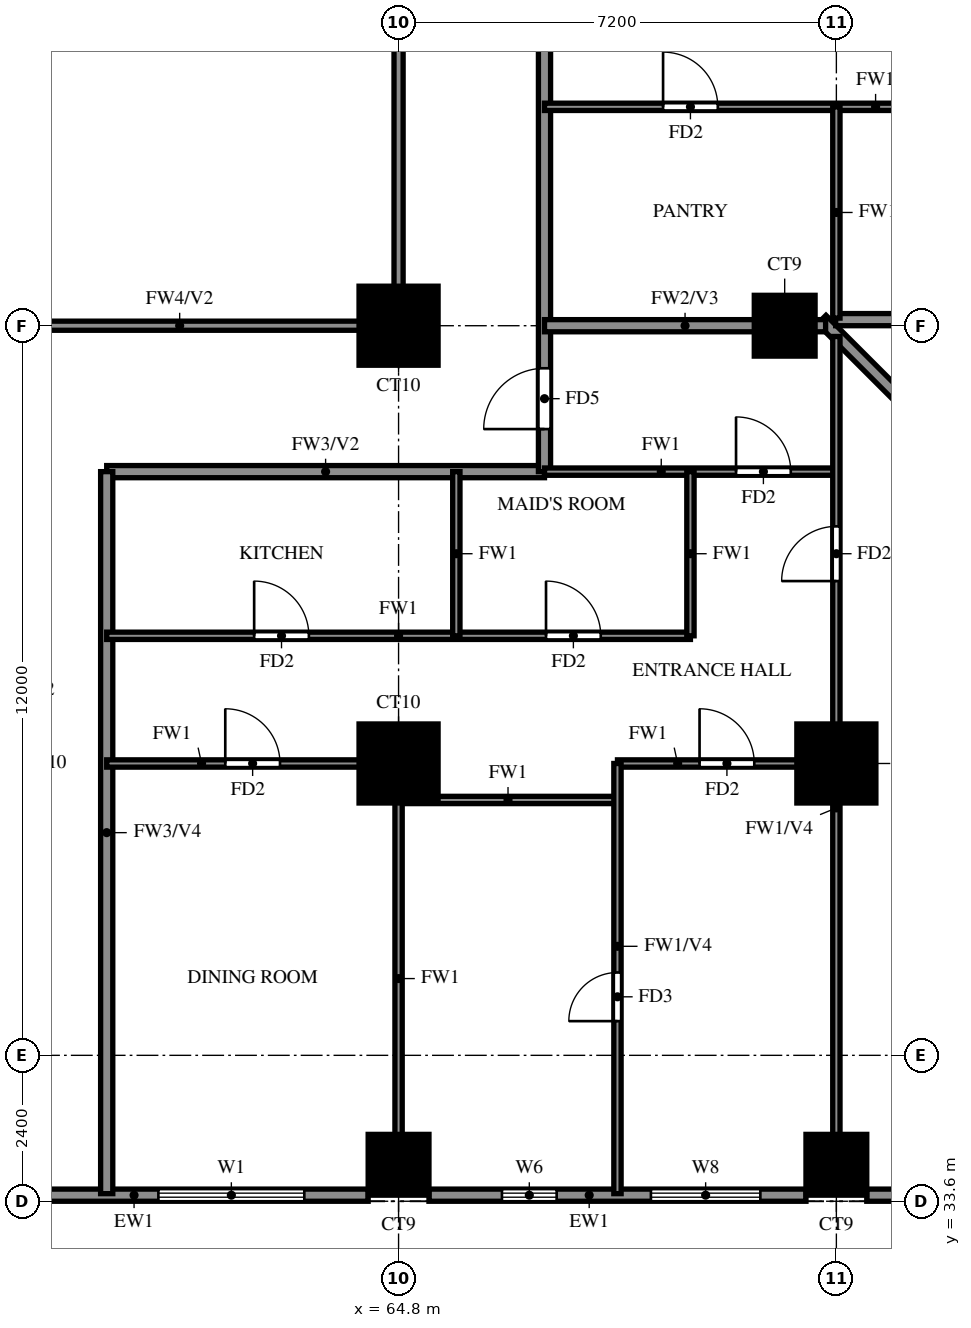
"""IFC4 building model, lengths in metres.
Left out: names, types, materials, properties, quantities, classifications, styles, units other than length and angle.
Written with IfcOpenShell. Run it as: python <this file> out.ifc"""

import sys

from ifc_helpers import new_model, si_unit, direction, frame, frame_2d, origin, origin_2d, place, context, subcontext, project, spatial, rectangle, extrude, source, transform, mapped, element, fill, save


model = new_model("IFC4")
c1 = context("Model", 3, precision=1e-05, world=origin(), true_north=direction((0.0, 1.0)))
c2 = subcontext(c1, "Body", "Model", "MODEL_VIEW")
j1 = project(units=[si_unit("LENGTHUNIT", "METRE"), si_unit("PLANEANGLEUNIT", "RADIAN")], contexts=[c1])
p1 = place(None, origin())
s1 = spatial("IfcSite", under=j1, at=p1, CompositionType="ELEMENT")
p2 = place(p1, origin())
s2 = spatial("IfcBuilding", under=s1, at=p2, CompositionType="ELEMENT")
p3 = place(p2, frame((0.0, 0.0, 76.0)))
s3 = spatial("IfcBuildingStorey", under=s2, at=p3, CompositionType="ELEMENT", Elevation=76.0)
m1 = source(origin(), c2, "Body", "SweptSolid", [
    extrude(rectangle(XDim=1.0, YDim=1.0, at=origin_2d()), origin(), (0.0, 0.0, 1.0), 3.18),
])
for number, where, z_axis, x_axis in (
    (1, (64.8, 34.2, 0.0), (0.0, 0.0, 1.0), (1.0, 0.0, 0.0)),
    (2, (72.0, 34.2, 0.0), (0.0, 0.0, 1.0), (1.0, 0.0, 0.0)),
):
    element("IfcColumn", number, at=place(p3, frame(where, z_axis=z_axis, x_axis=x_axis)), inside=s3, PredefinedType="COLUMN", context=c2, shape_type="MappedRepresentation", body=[
        mapped(m1, transform((0.0, 0.0, 0.0))),
    ])
m2 = source(origin(), c2, "Body", "SweptSolid", [
    extrude(rectangle(XDim=1.3, YDim=1.3, at=origin_2d()), origin(), (0.0, 0.0, 1.0), 3.18),
])
for number, where, z_axis, x_axis in (
    (3, (64.8, 40.8, 0.0), (0.0, 0.0, 1.0), (1.0, 0.0, 0.0)),
    (4, (72.0, 40.8, 0.0), (0.0, 0.0, 1.0), (1.0, 0.0, 0.0)),
    (5, (64.8, 48.0, 0.0), (0.0, 0.0, 1.0), (1.0, 0.0, 0.0)),
):
    element("IfcColumn", number, at=place(p3, frame(where, z_axis=z_axis, x_axis=x_axis)), inside=s3, PredefinedType="COLUMN", context=c2, shape_type="MappedRepresentation", body=[
        mapped(m2, transform((0.0, 0.0, 0.0))),
    ])
p4 = place(p3, frame((71.15, 48.0, 0.0), z_axis=(0.0, 0.0, 1.0), x_axis=(1.0, 0.0, 0.0)))
e6 = element("IfcColumn", 6, at=p4, inside=s3, PredefinedType="COLUMN", context=c2, shape_type="MappedRepresentation", body=[
    mapped(m1, transform((0.0, 0.0, 0.0))),
])
p5 = place(p3, frame((85.996, 33.863, 0.0), z_axis=(0.0, 0.0, 1.0), x_axis=(-0.707100718496, 0.707112843825, 0.0)))
e7 = element("IfcWall", 7, at=p5, inside=s3, PredefinedType="SOLIDWALL", context=c2, shape_type="SweptSolid", body=[
    extrude(rectangle(XDim=20.135, YDim=0.2, at=frame_2d((10.067, 0.0))), origin(), (0.0, 0.0, 1.0), 3.18),
])
p6 = place(p3, frame((71.989, 48.1, 0.0), z_axis=(0.0, 0.0, 1.0), x_axis=(1.0, 0.0, 0.0)))
e8 = element("IfcWall", 8, at=p6, inside=s3, PredefinedType="SOLIDWALL", context=c2, shape_type="SweptSolid", body=[
    extrude(rectangle(XDim=6.562, YDim=0.2, at=frame_2d((3.281, 0.0))), origin(), (0.0, 0.0, 1.0), 3.18),
])
p7 = place(p6, frame((2.206, 0.0, 1.5)))
e9 = element("IfcOpeningElement", 9, at=p7, cuts=e8, PredefinedType="OPENING", context=c2, shape_type="SweptSolid", body=[
    extrude(rectangle(XDim=0.9, YDim=0.9, at=frame_2d((0.45, 0.45))), frame((0.0, 0.11, 0.0), z_axis=(0.0, -1.0, 0.0), x_axis=(1.0, 0.0, 0.0)), (0.0, 0.0, 1.0), 0.22),
])
p8 = place(p3, frame((58.8, 33.7, 0.0), z_axis=(0.0, 0.0, 1.0), x_axis=(1.0, 0.0, 0.0)))
e10 = element("IfcWall", 10, at=p8, inside=s3, PredefinedType="SOLIDWALL", context=c2, shape_type="SweptSolid", body=[
    extrude(rectangle(XDim=5.5, YDim=0.2, at=frame_2d((2.75, 0.0))), origin(), (0.0, 0.0, 1.0), 3.18),
])
p9 = place(p8, frame((2.05, 0.0, 0.6)))
e11 = element("IfcOpeningElement", 11, at=p9, cuts=e10, PredefinedType="OPENING", context=c2, shape_type="SweptSolid", body=[
    extrude(rectangle(XDim=2.4, YDim=2.4, at=frame_2d((1.2, 1.2))), frame((0.0, 0.11, 0.0), z_axis=(0.0, -1.0, 0.0), x_axis=(1.0, 0.0, 0.0)), (0.0, 0.0, 1.0), 0.22),
])
p10 = place(p3, frame((65.3, 33.7, 0.0), z_axis=(0.0, 0.0, 1.0), x_axis=(1.0, 0.0, 0.0)))
e12 = element("IfcWall", 12, at=p10, inside=s3, PredefinedType="SOLIDWALL", context=c2, shape_type="SweptSolid", body=[
    extrude(rectangle(XDim=6.2, YDim=0.2, at=frame_2d((3.1, 0.0))), origin(), (0.0, 0.0, 1.0), 3.18),
])
p11 = place(p10, frame((3.65, 0.0, 0.6)))
e13 = element("IfcOpeningElement", 13, at=p11, cuts=e12, PredefinedType="OPENING", context=c2, shape_type="SweptSolid", body=[
    extrude(rectangle(XDim=1.8, YDim=2.4, at=frame_2d((0.9, 1.2))), frame((0.0, 0.11, 0.0), z_axis=(0.0, -1.0, 0.0), x_axis=(1.0, 0.0, 0.0)), (0.0, 0.0, 1.0), 0.22),
])
p12 = place(p10, frame((1.2, 0.0, 1.5)))
e14 = element("IfcOpeningElement", 14, at=p12, cuts=e12, PredefinedType="OPENING", context=c2, shape_type="SweptSolid", body=[
    extrude(rectangle(XDim=0.9, YDim=0.9, at=frame_2d((0.45, 0.45))), frame((0.0, 0.11, 0.0), z_axis=(0.0, -1.0, 0.0), x_axis=(1.0, 0.0, 0.0)), (0.0, 0.0, 1.0), 0.22),
])
p13 = place(p3, frame((72.5, 33.7, 0.0), z_axis=(0.0, 0.0, 1.0), x_axis=(1.0, 0.0, 0.0)))
e15 = element("IfcWall", 15, at=p13, inside=s3, PredefinedType="SOLIDWALL", context=c2, shape_type="SweptSolid", body=[
    extrude(rectangle(XDim=10.9, YDim=0.2, at=frame_2d((5.45, 0.0))), origin(), (0.0, 0.0, 1.0), 3.18),
])
p14 = place(p13, frame((5.8, 0.0, 0.0)))
e16 = element("IfcOpeningElement", 16, at=p14, cuts=e15, PredefinedType="OPENING", context=c2, shape_type="SweptSolid", body=[
    extrude(rectangle(XDim=1.8, YDim=2.4, at=frame_2d((0.9, 1.2))), frame((0.0, 0.11, 0.0), z_axis=(0.0, -1.0, 0.0), x_axis=(1.0, 0.0, 0.0)), (0.0, 0.0, 1.0), 0.22),
])
p15 = place(p13, frame((1.05, 0.0, 0.6)))
e17 = element("IfcOpeningElement", 17, at=p15, cuts=e15, PredefinedType="OPENING", context=c2, shape_type="SweptSolid", body=[
    extrude(rectangle(XDim=2.4, YDim=2.4, at=frame_2d((1.2, 1.2))), frame((0.0, 0.11, 0.0), z_axis=(0.0, -1.0, 0.0), x_axis=(1.0, 0.0, 0.0)), (0.0, 0.0, 1.0), 0.22),
])
p16 = place(p13, frame((8.4, 0.0, 0.6)))
e18 = element("IfcOpeningElement", 18, at=p16, cuts=e15, PredefinedType="OPENING", context=c2, shape_type="SweptSolid", body=[
    extrude(rectangle(XDim=1.8, YDim=2.4, at=frame_2d((0.9, 1.2))), frame((0.0, 0.11, 0.0), z_axis=(0.0, -1.0, 0.0), x_axis=(1.0, 0.0, 0.0)), (0.0, 0.0, 1.0), 0.22),
])
p17 = place(p3, frame((60.0, 45.6, 0.0), z_axis=(0.0, 0.0, 1.0), x_axis=(1.0, 0.0, 0.0)))
e19 = element("IfcWall", 19, at=p17, inside=s3, PredefinedType="SOLIDWALL", context=c2, shape_type="SweptSolid", body=[
    extrude(rectangle(XDim=7.2, YDim=0.2, at=frame_2d((3.6, 0.0))), origin(), (0.0, 0.0, 1.0), 3.18),
])
p18 = place(p3, frame((60.0, 33.725, 0.0), z_axis=(0.0, 0.0, 1.0), x_axis=(0.0, 1.0, 0.0)))
e20 = element("IfcWall", 20, at=p18, inside=s3, PredefinedType="SOLIDWALL", context=c2, shape_type="SweptSolid", body=[
    extrude(rectangle(XDim=11.875, YDim=0.2, at=frame_2d((5.938, 0.0))), origin(), (0.0, 0.0, 1.0), 2.28),
])
p19 = place(p3, frame((67.2, 45.6, 0.0), z_axis=(0.0, 0.0, 1.0), x_axis=(0.0, 1.0, 0.0)))
e21 = element("IfcWall", 21, at=p19, inside=s3, PredefinedType="SOLIDWALL", context=c2, shape_type="SweptSolid", body=[
    extrude(rectangle(XDim=14.4, YDim=0.2, at=frame_2d((7.2, 0.0))), origin(), (0.0, 0.0, 1.0), 3.18),
])
p20 = place(p19, frame((0.7, 0.0, 0.0)))
e22 = element("IfcOpeningElement", 22, at=p20, cuts=e21, PredefinedType="OPENING", context=c2, shape_type="SweptSolid", body=[
    extrude(rectangle(XDim=1.0, YDim=2.1, at=frame_2d((0.5, 1.05))), frame((0.0, 0.11, 0.0), z_axis=(0.0, -1.0, 0.0), x_axis=(1.0, 0.0, 0.0)), (0.0, 0.0, 1.0), 0.22),
])
p21 = place(p3, frame((67.2, 48.0, 0.0), z_axis=(0.0, 0.0, 1.0), x_axis=(1.0, 0.0, 0.0)))
e23 = element("IfcWall", 23, at=p21, inside=s3, PredefinedType="SOLIDWALL", context=c2, shape_type="SweptSolid", body=[
    extrude(rectangle(XDim=4.623, YDim=0.2, at=frame_2d((2.312, 0.0))), origin(), (0.0, 0.0, 1.0), 3.18),
])
p22 = place(p3, frame((64.8, 40.2, 0.0), z_axis=(0.0, 0.0, 1.0), x_axis=(1.0, 0.0, 0.0)))
e24 = element("IfcWall", 24, at=p22, inside=s3, PredefinedType="PARTITIONING", context=c2, shape_type="SweptSolid", body=[
    extrude(rectangle(XDim=3.6, YDim=0.12, at=frame_2d((1.8, 0.0))), origin(), (0.0, 0.0, 1.0), 3.18),
])
p23 = place(p3, frame((60.0, 40.8, 0.0), z_axis=(0.0, 0.0, 1.0), x_axis=(1.0, 0.0, 0.0)))
e25 = element("IfcWall", 25, at=p23, inside=s3, PredefinedType="PARTITIONING", context=c2, shape_type="SweptSolid", body=[
    extrude(rectangle(XDim=4.8, YDim=0.12, at=frame_2d((2.4, 0.0))), origin(), (0.0, 0.0, 1.0), 3.18),
])
p24 = place(p23, frame((1.95, 0.0, 0.0)))
e26 = element("IfcOpeningElement", 26, at=p24, cuts=e25, PredefinedType="OPENING", context=c2, shape_type="SweptSolid", body=[
    extrude(rectangle(XDim=0.9, YDim=2.1, at=frame_2d((0.45, 1.05))), frame((0.0, 0.07, 0.0), z_axis=(0.0, -1.0, 0.0), x_axis=(1.0, 0.0, 0.0)), (0.0, 0.0, 1.0), 0.14),
])
p25 = place(p3, frame((68.4, 40.8, 0.0), z_axis=(0.0, 0.0, 1.0), x_axis=(1.0, 0.0, 0.0)))
e27 = element("IfcWall", 27, at=p25, inside=s3, PredefinedType="PARTITIONING", context=c2, shape_type="SweptSolid", body=[
    extrude(rectangle(XDim=3.6, YDim=0.12, at=frame_2d((1.8, 0.0))), origin(), (0.0, 0.0, 1.0), 3.18),
])
p26 = place(p25, frame((1.35, 0.0, 0.0)))
e28 = element("IfcOpeningElement", 28, at=p26, cuts=e27, PredefinedType="OPENING", context=c2, shape_type="SweptSolid", body=[
    extrude(rectangle(XDim=0.9, YDim=2.1, at=frame_2d((0.45, 1.05))), frame((0.0, 0.07, 0.0), z_axis=(0.0, -1.0, 0.0), x_axis=(1.0, 0.0, 0.0)), (0.0, 0.0, 1.0), 0.14),
])
p27 = place(p3, frame((60.0, 42.9, 0.0), z_axis=(0.0, 0.0, 1.0), x_axis=(1.0, 0.0, 0.0)))
e29 = element("IfcWall", 29, at=p27, inside=s3, PredefinedType="PARTITIONING", context=c2, shape_type="SweptSolid", body=[
    extrude(rectangle(XDim=9.6, YDim=0.12, at=frame_2d((4.8, 0.0))), origin(), (0.0, 0.0, 1.0), 3.18),
])
p28 = place(p27, frame((7.225, 0.0, 0.0)))
e30 = element("IfcOpeningElement", 30, at=p28, cuts=e29, PredefinedType="OPENING", context=c2, shape_type="SweptSolid", body=[
    extrude(rectangle(XDim=0.9, YDim=2.1, at=frame_2d((0.45, 1.05))), frame((0.0, 0.07, 0.0), z_axis=(0.0, -1.0, 0.0), x_axis=(1.0, 0.0, 0.0)), (0.0, 0.0, 1.0), 0.14),
])
p29 = place(p27, frame((2.425, 0.0, 0.0)))
e31 = element("IfcOpeningElement", 31, at=p29, cuts=e29, PredefinedType="OPENING", context=c2, shape_type="SweptSolid", body=[
    extrude(rectangle(XDim=0.9, YDim=2.1, at=frame_2d((0.45, 1.05))), frame((0.0, 0.07, 0.0), z_axis=(0.0, -1.0, 0.0), x_axis=(1.0, 0.0, 0.0)), (0.0, 0.0, 1.0), 0.14),
])
p30 = place(p3, frame((67.2, 45.6, 0.0), z_axis=(0.0, 0.0, 1.0), x_axis=(1.0, 0.0, 0.0)))
e32 = element("IfcWall", 32, at=p30, inside=s3, PredefinedType="PARTITIONING", context=c2, shape_type="SweptSolid", body=[
    extrude(rectangle(XDim=4.8, YDim=0.12, at=frame_2d((2.4, 0.0))), origin(), (0.0, 0.0, 1.0), 3.18),
])
p31 = place(p30, frame((3.15, 0.0, 0.0)))
e33 = element("IfcOpeningElement", 33, at=p31, cuts=e32, PredefinedType="OPENING", context=c2, shape_type="SweptSolid", body=[
    extrude(rectangle(XDim=0.9, YDim=2.1, at=frame_2d((0.45, 1.05))), frame((0.0, 0.07, 0.0), z_axis=(0.0, -1.0, 0.0), x_axis=(1.0, 0.0, 0.0)), (0.0, 0.0, 1.0), 0.14),
])
p32 = place(p3, frame((67.2, 51.6, 0.0), z_axis=(0.0, 0.0, 1.0), x_axis=(1.0, 0.0, 0.0)))
e34 = element("IfcWall", 34, at=p32, inside=s3, PredefinedType="PARTITIONING", context=c2, shape_type="SweptSolid", body=[
    extrude(rectangle(XDim=9.9, YDim=0.12, at=frame_2d((4.95, 0.0))), origin(), (0.0, 0.0, 1.0), 3.18),
])
p33 = place(p32, frame((6.95, 0.0, 0.0)))
e35 = element("IfcOpeningElement", 35, at=p33, cuts=e34, PredefinedType="OPENING", context=c2, shape_type="SweptSolid", body=[
    extrude(rectangle(XDim=0.8, YDim=2.1, at=frame_2d((0.4, 1.05))), frame((0.0, 0.07, 0.0), z_axis=(0.0, -1.0, 0.0), x_axis=(1.0, 0.0, 0.0)), (0.0, 0.0, 1.0), 0.14),
])
p34 = place(p32, frame((1.95, 0.0, 0.0)))
e36 = element("IfcOpeningElement", 36, at=p34, cuts=e34, PredefinedType="OPENING", context=c2, shape_type="SweptSolid", body=[
    extrude(rectangle(XDim=0.9, YDim=2.1, at=frame_2d((0.45, 1.05))), frame((0.0, 0.07, 0.0), z_axis=(0.0, -1.0, 0.0), x_axis=(1.0, 0.0, 0.0)), (0.0, 0.0, 1.0), 0.14),
])
p35 = place(p3, frame((64.8, 33.725, 0.0), z_axis=(0.0, 0.0, 1.0), x_axis=(0.0, 1.0, 0.0)))
e37 = element("IfcWall", 37, at=p35, inside=s3, PredefinedType="PARTITIONING", context=c2, shape_type="SweptSolid", body=[
    extrude(rectangle(XDim=7.075, YDim=0.12, at=frame_2d((3.538, 0.0))), origin(), (0.0, 0.0, 1.0), 3.18),
])
p36 = place(p3, frame((65.75, 42.9, 0.0), z_axis=(0.0, 0.0, 1.0), x_axis=(0.0, 1.0, 0.0)))
e38 = element("IfcWall", 38, at=p36, inside=s3, PredefinedType="PARTITIONING", context=c2, shape_type="SweptSolid", body=[
    extrude(rectangle(XDim=2.7, YDim=0.12, at=frame_2d((1.35, 0.0))), origin(), (0.0, 0.0, 1.0), 3.18),
])
p37 = place(p3, frame((68.4, 33.725, 0.0), z_axis=(0.0, 0.0, 1.0), x_axis=(0.0, 1.0, 0.0)))
e39 = element("IfcWall", 39, at=p37, inside=s3, PredefinedType="PARTITIONING", context=c2, shape_type="SweptSolid", body=[
    extrude(rectangle(XDim=7.075, YDim=0.12, at=frame_2d((3.538, 0.0))), origin(), (0.0, 0.0, 1.0), 2.28),
])
p38 = place(p37, frame((2.837, 0.0, 0.0)))
e40 = element("IfcOpeningElement", 40, at=p38, cuts=e39, PredefinedType="OPENING", context=c2, shape_type="SweptSolid", body=[
    extrude(rectangle(XDim=0.8, YDim=2.1, at=frame_2d((0.4, 1.05))), frame((0.0, 0.07, 0.0), z_axis=(0.0, -1.0, 0.0), x_axis=(1.0, 0.0, 0.0)), (0.0, 0.0, 1.0), 0.14),
])
p39 = place(p3, frame((69.6, 42.9, 0.0), z_axis=(0.0, 0.0, 1.0), x_axis=(0.0, 1.0, 0.0)))
e41 = element("IfcWall", 41, at=p39, inside=s3, PredefinedType="PARTITIONING", context=c2, shape_type="SweptSolid", body=[
    extrude(rectangle(XDim=2.7, YDim=0.12, at=frame_2d((1.35, 0.0))), origin(), (0.0, 0.0, 1.0), 3.18),
])
p40 = place(p3, frame((72.0, 33.725, 0.0), z_axis=(0.0, 0.0, 1.0), x_axis=(0.0, 1.0, 0.0)))
e42 = element("IfcWall", 42, at=p40, inside=s3, PredefinedType="PARTITIONING", context=c2, shape_type="SweptSolid", body=[
    extrude(rectangle(XDim=14.098, YDim=0.12, at=frame_2d((7.049, 0.0))), origin(), (0.0, 0.0, 1.0), 2.28),
])
p41 = place(p40, frame((10.075, 0.0, 0.0)))
e43 = element("IfcOpeningElement", 43, at=p41, cuts=e42, PredefinedType="OPENING", context=c2, shape_type="SweptSolid", body=[
    extrude(rectangle(XDim=0.9, YDim=2.1, at=frame_2d((0.45, 1.05))), frame((0.0, 0.07, 0.0), z_axis=(0.0, -1.0, 0.0), x_axis=(1.0, 0.0, 0.0)), (0.0, 0.0, 1.0), 0.14),
])
p42 = place(p3, frame((72.0, 48.125, 0.0), z_axis=(0.0, 0.0, 1.0), x_axis=(0.0, 1.0, 0.0)))
e44 = element("IfcWall", 44, at=p42, inside=s3, PredefinedType="PARTITIONING", context=c2, shape_type="SweptSolid", body=[
    extrude(rectangle(XDim=3.475, YDim=0.12, at=frame_2d((1.738, 0.0))), origin(), (0.0, 0.0, 1.0), 3.18),
])
p43 = place(p3, frame((57.6, 48.0, 0.0), z_axis=(0.0, 0.0, 1.0), x_axis=(1.0, 0.0, 0.0)))
e45 = element("IfcWall", 45, at=p43, inside=s3, PredefinedType="SOLIDWALL", context=c2, shape_type="SweptSolid", body=[
    extrude(rectangle(XDim=7.2, YDim=0.15, at=frame_2d((3.6, 0.0))), origin(), (0.0, 0.0, 1.0), 2.28),
])
p44 = place(p3, frame((64.8, 48.0, 0.0), z_axis=(0.0, 0.0, 1.0), x_axis=(0.0, 1.0, 0.0)))
e46 = element("IfcWall", 46, at=p44, inside=s3, PredefinedType="SOLIDWALL", context=c2, shape_type="SweptSolid", body=[
    extrude(rectangle(XDim=14.4, YDim=0.15, at=frame_2d((7.2, 0.0))), origin(), (0.0, 0.0, 1.0), 2.28),
])
p45 = place(p9, origin())
e47 = element("IfcWindow", 47, at=p45, inside=s3, PartitioningType="DOUBLE_PANEL_VERTICAL", PredefinedType="WINDOW", context=c2, shape_type="SweptSolid", body=[
    extrude(rectangle(XDim=2.4, YDim=2.4, at=frame_2d((1.2, 1.2))), frame((0.0, 0.03, 0.0), z_axis=(0.0, -1.0, 0.0), x_axis=(1.0, 0.0, 0.0)), (0.0, 0.0, 1.0), 0.06),
])
fill(e11, e47)
p46 = place(p11, origin())
e48 = element("IfcWindow", 48, at=p46, inside=s3, PartitioningType="DOUBLE_PANEL_VERTICAL", PredefinedType="WINDOW", context=c2, shape_type="SweptSolid", body=[
    extrude(rectangle(XDim=1.8, YDim=2.4, at=frame_2d((0.9, 1.2))), frame((0.0, 0.03, 0.0), z_axis=(0.0, -1.0, 0.0), x_axis=(1.0, 0.0, 0.0)), (0.0, 0.0, 1.0), 0.06),
])
fill(e13, e48)
p47 = place(p12, origin())
e49 = element("IfcWindow", 49, at=p47, inside=s3, PartitioningType="SINGLE_PANEL", PredefinedType="WINDOW", context=c2, shape_type="SweptSolid", body=[
    extrude(rectangle(XDim=0.9, YDim=0.9, at=frame_2d((0.45, 0.45))), frame((0.0, 0.03, 0.0), z_axis=(0.0, -1.0, 0.0), x_axis=(1.0, 0.0, 0.0)), (0.0, 0.0, 1.0), 0.06),
])
fill(e14, e49)
p48 = place(p34, origin())
e50 = element("IfcDoor", 50, at=p48, inside=s3, OperationType="SINGLE_SWING_RIGHT", PredefinedType="DOOR", context=c2, shape_type="SweptSolid", body=[
    extrude(rectangle(XDim=0.9, YDim=2.1, at=frame_2d((0.45, 1.05))), frame((0.0, 0.025, 0.0), z_axis=(0.0, -1.0, 0.0), x_axis=(1.0, 0.0, 0.0)), (0.0, 0.0, 1.0), 0.05),
])
fill(e36, e50)
p49 = place(p31, origin())
e51 = element("IfcDoor", 51, at=p49, inside=s3, OperationType="SINGLE_SWING_LEFT", PredefinedType="DOOR", context=c2, shape_type="SweptSolid", body=[
    extrude(rectangle(XDim=0.9, YDim=2.1, at=frame_2d((0.45, 1.05))), frame((0.0, 0.025, 0.0), z_axis=(0.0, -1.0, 0.0), x_axis=(1.0, 0.0, 0.0)), (0.0, 0.0, 1.0), 0.05),
])
fill(e33, e51)
p50 = place(p20, origin())
e52 = element("IfcDoor", 52, at=p50, inside=s3, OperationType="SINGLE_SWING_LEFT", PredefinedType="DOOR", context=c2, shape_type="SweptSolid", body=[
    extrude(rectangle(XDim=1.0, YDim=2.1, at=frame_2d((0.5, 1.05))), frame((0.0, 0.025, 0.0), z_axis=(0.0, -1.0, 0.0), x_axis=(1.0, 0.0, 0.0)), (0.0, 0.0, 1.0), 0.05),
])
fill(e22, e52)
p51 = place(p26, origin())
e53 = element("IfcDoor", 53, at=p51, inside=s3, OperationType="SINGLE_SWING_RIGHT", PredefinedType="DOOR", context=c2, shape_type="SweptSolid", body=[
    extrude(rectangle(XDim=0.9, YDim=2.1, at=frame_2d((0.45, 1.05))), frame((0.0, 0.025, 0.0), z_axis=(0.0, -1.0, 0.0), x_axis=(1.0, 0.0, 0.0)), (0.0, 0.0, 1.0), 0.05),
])
fill(e28, e53)
p52 = place(p38, origin())
e54 = element("IfcDoor", 54, at=p52, inside=s3, OperationType="SINGLE_SWING_LEFT", PredefinedType="DOOR", context=c2, shape_type="SweptSolid", body=[
    extrude(rectangle(XDim=0.8, YDim=2.1, at=frame_2d((0.4, 1.05))), frame((0.0, 0.025, 0.0), z_axis=(0.0, -1.0, 0.0), x_axis=(1.0, 0.0, 0.0)), (0.0, 0.0, 1.0), 0.05),
])
fill(e40, e54)
p53 = place(p24, origin())
e55 = element("IfcDoor", 55, at=p53, inside=s3, OperationType="SINGLE_SWING_LEFT", PredefinedType="DOOR", context=c2, shape_type="SweptSolid", body=[
    extrude(rectangle(XDim=0.9, YDim=2.1, at=frame_2d((0.45, 1.05))), frame((0.0, 0.025, 0.0), z_axis=(0.0, -1.0, 0.0), x_axis=(1.0, 0.0, 0.0)), (0.0, 0.0, 1.0), 0.05),
])
fill(e26, e55)
p54 = place(p28, origin())
e56 = element("IfcDoor", 56, at=p54, inside=s3, OperationType="SINGLE_SWING_RIGHT", PredefinedType="DOOR", context=c2, shape_type="SweptSolid", body=[
    extrude(rectangle(XDim=0.9, YDim=2.1, at=frame_2d((0.45, 1.05))), frame((0.0, 0.025, 0.0), z_axis=(0.0, -1.0, 0.0), x_axis=(1.0, 0.0, 0.0)), (0.0, 0.0, 1.0), 0.05),
])
fill(e30, e56)
p55 = place(p29, origin())
e57 = element("IfcDoor", 57, at=p55, inside=s3, OperationType="SINGLE_SWING_LEFT", PredefinedType="DOOR", context=c2, shape_type="SweptSolid", body=[
    extrude(rectangle(XDim=0.9, YDim=2.1, at=frame_2d((0.45, 1.05))), frame((0.0, 0.025, 0.0), z_axis=(0.0, -1.0, 0.0), x_axis=(1.0, 0.0, 0.0)), (0.0, 0.0, 1.0), 0.05),
])
fill(e31, e57)
p56 = place(p41, origin())
e58 = element("IfcDoor", 58, at=p56, inside=s3, OperationType="SINGLE_SWING_LEFT", PredefinedType="DOOR", context=c2, shape_type="SweptSolid", body=[
    extrude(rectangle(XDim=0.9, YDim=2.1, at=frame_2d((0.45, 1.05))), frame((0.0, 0.025, 0.0), z_axis=(0.0, -1.0, 0.0), x_axis=(1.0, 0.0, 0.0)), (0.0, 0.0, 1.0), 0.05),
])
fill(e43, e58)
save(model, sys.argv[1])
